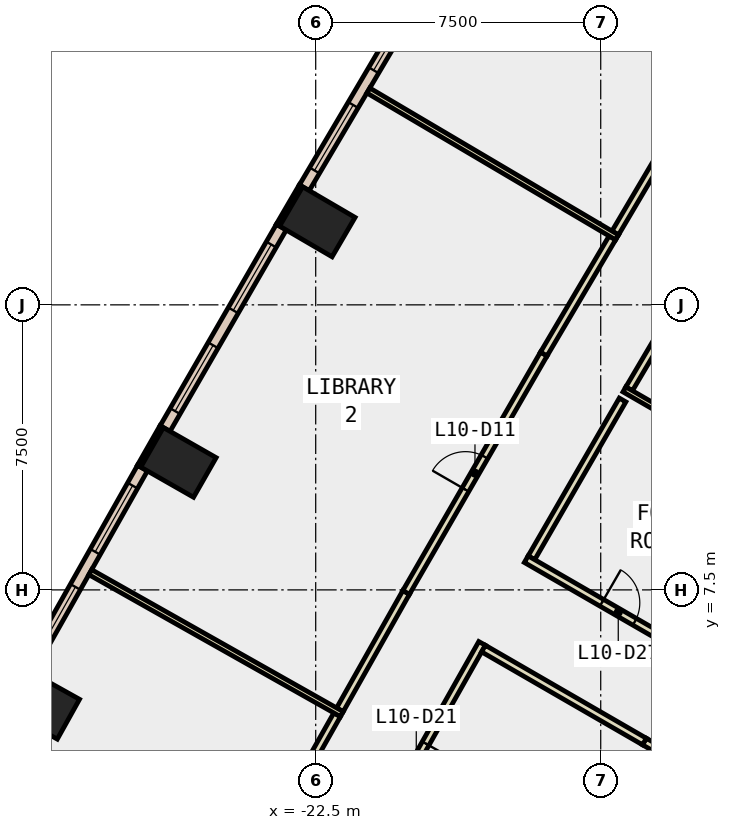
"""IFC4 building model, lengths in metres.
Left out: names, types, materials, properties, quantities, classifications, styles, units other than length and angle.
Written with IfcOpenShell. Run it as: python <this file> out.ifc"""

import sys

from ifc_helpers import new_model, si_unit, direction, frame, frame_2d, origin, origin_2d, place, context, subcontext, project, spatial, polyline, rectangle, outline, extrude, element, fill, save


model = new_model("IFC4")
c1 = context("Model", 3, precision=1e-05, world=origin(), true_north=direction((0.0, 1.0)))
c2 = subcontext(c1, "Body", "Model", "MODEL_VIEW")
j1 = project(units=[si_unit("LENGTHUNIT", "METRE"), si_unit("PLANEANGLEUNIT", "RADIAN")], contexts=[c1])
p1 = place(None, origin())
s1 = spatial("IfcSite", under=j1, at=p1, CompositionType="ELEMENT")
p2 = place(p1, origin())
s2 = spatial("IfcBuilding", under=s1, at=p2, CompositionType="ELEMENT")
p3 = place(p2, frame((0.0, 0.0, 51.8)))
s3 = spatial("IfcBuildingStorey", under=s2, at=p3, CompositionType="ELEMENT", Elevation=51.8)
for number, where, z_axis, x_axis in (
    (1, (-22.457, 17.186, -0.4), (0.0, 0.0, 1.0), (0.504, 0.864, 0.0)),
    (2, (-26.112, 10.855, -0.4), (0.0, 0.0, 1.0), (0.496, 0.869, 0.0)),
    (3, (-29.706, 4.487, -0.4), (0.0, 0.0, 1.0), (0.487, 0.873, 0.0)),
):
    element("IfcColumn", number, at=place(p3, frame(where, z_axis=z_axis, x_axis=x_axis)), inside=s3, PredefinedType="COLUMN", context=c2, shape_type="SweptSolid", body=[
        extrude(rectangle(XDim=1.2, YDim=1.6, at=origin_2d()), origin(), (0.0, 0.0, 1.0), 4.2),
    ])
p4 = place(p3, frame((0.0, 0.0, -0.4)))
e4 = element("IfcWall", 4, at=p4, inside=s3, PredefinedType="SHEAR", context=c2, shape_type="SweptSolid", body=[
    extrude(outline(polyline([(-12.402, 3.02), (-13.267, 3.52), (-13.856, 2.5), (-12.702, 2.5), (-12.402, 3.02)])), origin(), (0.0, 0.0, 1.0), 4.2),
])
p5 = place(p3, frame((-22.888, 18.133, 0.0), z_axis=(0.0, 0.0, 1.0), x_axis=(-0.504225229382, -0.863572184623, 0.0)))
e5 = element("IfcWall", 5, at=p5, inside=s3, PredefinedType="STANDARD", context=c2, shape_type="SweptSolid", body=[
    extrude(rectangle(XDim=1.2, YDim=0.1, at=frame_2d((0.6, 0.0))), origin(), (0.0, 0.0, 1.0), 3.8),
])
p6 = place(p3, frame((-26.553, 11.797, 0.0), z_axis=(0.0, 0.0, 1.0), x_axis=(-0.495766453659, -0.86845588456, 0.0)))
e6 = element("IfcWall", 6, at=p6, inside=s3, PredefinedType="STANDARD", context=c2, shape_type="SweptSolid", body=[
    extrude(rectangle(XDim=1.2, YDim=0.1, at=frame_2d((0.6, 0.0))), origin(), (0.0, 0.0, 1.0), 3.8),
])
p7 = place(p3, frame((-19.688, 23.351, 0.0), z_axis=(0.0, 0.0, 1.0), x_axis=(-0.508412153373, -0.861113861404, 0.0)))
e7 = element("IfcWall", 7, at=p7, inside=s3, PredefinedType="STANDARD", context=c2, shape_type="SweptSolid", body=[
    extrude(rectangle(XDim=6.121, YDim=0.3, at=frame_2d((3.061, 0.0))), origin(), (0.0, 0.0, 1.0), 3.8),
])
p8 = place(p7, frame((0.53, 0.0, 0.9)))
e8 = element("IfcOpeningElement", 8, at=p8, cuts=e7, PredefinedType="OPENING", context=c2, shape_type="SweptSolid", body=[
    extrude(rectangle(XDim=2.0, YDim=2.6, at=frame_2d((1.0, 1.3))), frame((0.0, 0.16, 0.0), z_axis=(0.0, -1.0, 0.0), x_axis=(1.0, 0.0, 0.0)), (0.0, 0.0, 1.0), 0.32),
])
p9 = place(p7, frame((3.591, 0.0, 0.9)))
e9 = element("IfcOpeningElement", 9, at=p9, cuts=e7, PredefinedType="OPENING", context=c2, shape_type="SweptSolid", body=[
    extrude(rectangle(XDim=2.0, YDim=2.6, at=frame_2d((1.0, 1.3))), frame((0.0, 0.16, 0.0), z_axis=(0.0, -1.0, 0.0), x_axis=(1.0, 0.0, 0.0)), (0.0, 0.0, 1.0), 0.32),
])
p10 = place(p3, frame((-23.404, 17.046, 0.0), z_axis=(0.0, 0.0, 1.0), x_axis=(-0.499957248001, -0.866050085256, 0.0)))
e10 = element("IfcWall", 10, at=p10, inside=s3, PredefinedType="STANDARD", context=c2, shape_type="SweptSolid", body=[
    extrude(rectangle(XDim=6.121, YDim=0.3, at=frame_2d((3.06, 0.0))), origin(), (0.0, 0.0, 1.0), 3.8),
])
p11 = place(p10, frame((0.53, 0.0, 0.9)))
e11 = element("IfcOpeningElement", 11, at=p11, cuts=e10, PredefinedType="OPENING", context=c2, shape_type="SweptSolid", body=[
    extrude(rectangle(XDim=2.0, YDim=2.6, at=frame_2d((1.0, 1.3))), frame((0.0, 0.16, 0.0), z_axis=(0.0, -1.0, 0.0), x_axis=(1.0, 0.0, 0.0)), (0.0, 0.0, 1.0), 0.32),
])
p12 = place(p10, frame((3.591, 0.0, 0.9)))
e12 = element("IfcOpeningElement", 12, at=p12, cuts=e10, PredefinedType="OPENING", context=c2, shape_type="SweptSolid", body=[
    extrude(rectangle(XDim=2.0, YDim=2.6, at=frame_2d((1.0, 1.3))), frame((0.0, 0.16, 0.0), z_axis=(0.0, -1.0, 0.0), x_axis=(1.0, 0.0, 0.0)), (0.0, 0.0, 1.0), 0.32),
])
p13 = place(p3, frame((-27.058, 10.705, 0.0), z_axis=(0.0, 0.0, 1.0), x_axis=(-0.49151046248, -0.870871669807, 0.0)))
e13 = element("IfcWall", 13, at=p13, inside=s3, PredefinedType="STANDARD", context=c2, shape_type="SweptSolid", body=[
    extrude(rectangle(XDim=6.122, YDim=0.3, at=frame_2d((3.061, 0.0))), origin(), (0.0, 0.0, 1.0), 3.8),
])
p14 = place(p13, frame((0.53, 0.0, 0.9)))
e14 = element("IfcOpeningElement", 14, at=p14, cuts=e13, PredefinedType="OPENING", context=c2, shape_type="SweptSolid", body=[
    extrude(rectangle(XDim=2.0, YDim=2.6, at=frame_2d((1.0, 1.3))), frame((0.0, 0.16, 0.0), z_axis=(0.0, -1.0, 0.0), x_axis=(1.0, 0.0, 0.0)), (0.0, 0.0, 1.0), 0.32),
])
p15 = place(p13, frame((3.591, 0.0, 0.9)))
e15 = element("IfcOpeningElement", 15, at=p15, cuts=e13, PredefinedType="OPENING", context=c2, shape_type="SweptSolid", body=[
    extrude(rectangle(XDim=2.0, YDim=2.6, at=frame_2d((1.0, 1.3))), frame((0.0, 0.16, 0.0), z_axis=(0.0, -1.0, 0.0), x_axis=(1.0, 0.0, 0.0)), (0.0, 0.0, 1.0), 0.32),
])
p16 = place(p3, frame((-14.425, 12.497, 0.0), z_axis=(0.0, 0.0, 1.0), x_axis=(-0.500026519606, -0.866010092142, 0.0)))
e16 = element("IfcWall", 16, at=p16, inside=s3, PredefinedType="PARTITIONING", context=c2, shape_type="SweptSolid", body=[
    extrude(rectangle(XDim=4.796, YDim=0.2, at=frame_2d((2.398, 0.0))), origin(), (0.0, 0.0, 1.0), 3.8),
])
p17 = place(p3, frame((-16.96, 8.308, 0.0), z_axis=(0.0, 0.0, 1.0), x_axis=(0.866018717003, -0.500011581666, 0.0)))
e17 = element("IfcWall", 17, at=p17, inside=s3, PredefinedType="PARTITIONING", context=c2, shape_type="SweptSolid", body=[
    extrude(rectangle(XDim=5.092, YDim=0.2, at=frame_2d((2.546, 0.0))), origin(), (0.0, 0.0, 1.0), 3.8),
])
p18 = place(p17, frame((2.296, 0.0, 0.0)))
e18 = element("IfcOpeningElement", 18, at=p18, cuts=e17, PredefinedType="OPENING", context=c2, shape_type="SweptSolid", body=[
    extrude(rectangle(XDim=1.0, YDim=2.1, at=frame_2d((0.5, 1.05))), frame((0.0, 0.11, 0.0), z_axis=(0.0, -1.0, 0.0), x_axis=(1.0, 0.0, 0.0)), (0.0, 0.0, 1.0), 0.22),
])
p19 = place(p3, frame((-13.323, 14.364, 0.0), z_axis=(0.0, 0.0, 1.0), x_axis=(-0.508274698505, -0.861195001646, 0.0)))
e19 = element("IfcWall", 19, at=p19, inside=s3, PredefinedType="PARTITIONING", context=c2, shape_type="SweptSolid", body=[
    extrude(rectangle(XDim=1.828, YDim=0.2, at=frame_2d((0.914, 0.0))), origin(), (0.0, 0.0, 1.0), 3.8),
])
p20 = place(p3, frame((-13.417, 3.26, 0.0), z_axis=(0.0, 0.0, 1.0), x_axis=(-0.866071776036, 0.499919672301, 0.0)))
e20 = element("IfcWall", 20, at=p20, inside=s3, PredefinedType="PARTITIONING", context=c2, shape_type="SweptSolid", body=[
    extrude(rectangle(XDim=0.5, YDim=0.2, at=frame_2d((0.25, 0.0))), origin(), (0.0, 0.0, 1.0), 2.4),
])
p21 = place(p3, frame((-18.122, 6.092, 0.0), z_axis=(0.0, 0.0, 1.0), x_axis=(-0.491430359405, -0.870916874251, 0.0)))
e21 = element("IfcWall", 21, at=p21, inside=s3, PredefinedType="PARTITIONING", context=c2, shape_type="SweptSolid", body=[
    extrude(rectangle(XDim=7.047, YDim=0.2, at=frame_2d((3.523, 0.0))), origin(), (0.0, 0.0, 1.0), 3.8),
])
p22 = place(p21, frame((3.024, 0.0, 0.0)))
e22 = element("IfcOpeningElement", 22, at=p22, cuts=e21, PredefinedType="OPENING", context=c2, shape_type="SweptSolid", body=[
    extrude(rectangle(XDim=1.0, YDim=2.1, at=frame_2d((0.5, 1.05))), frame((0.0, 0.11, 0.0), z_axis=(0.0, -1.0, 0.0), x_axis=(1.0, 0.0, 0.0)), (0.0, 0.0, 1.0), 0.22),
])
p23 = place(p3, frame((-14.618, 16.891, 0.0), z_axis=(0.0, 0.0, 1.0), x_axis=(0.508267810274, 0.861199067022, 0.0)))
e23 = element("IfcWall", 23, at=p23, inside=s3, PredefinedType="PARTITIONING", context=c2, shape_type="SweptSolid", body=[
    extrude(rectangle(XDim=3.547, YDim=0.2, at=frame_2d((1.774, 0.0))), origin(), (0.0, 0.0, 1.0), 3.8),
])
p24 = place(p3, frame((-21.863, 4.345, 0.0), z_axis=(0.0, 0.0, 1.0), x_axis=(0.491394823876, 0.87093692485, 0.0)))
e24 = element("IfcWall", 24, at=p24, inside=s3, PredefinedType="PARTITIONING", context=c2, shape_type="SweptSolid", body=[
    extrude(rectangle(XDim=3.547, YDim=0.2, at=frame_2d((1.773, 0.0))), origin(), (0.0, 0.0, 1.0), 3.8),
])
p25 = place(p3, frame((-20.12, 7.434, 0.0), z_axis=(0.0, 0.0, 1.0), x_axis=(0.500039488902, 0.866002603656, 0.0)))
e25 = element("IfcWall", 25, at=p25, inside=s3, PredefinedType="PARTITIONING", context=c2, shape_type="SweptSolid", body=[
    extrude(rectangle(XDim=7.244, YDim=0.2, at=frame_2d((3.622, 0.0))), origin(), (0.0, 0.0, 1.0), 3.8),
])
p26 = place(p25, frame((3.122, 0.0, 0.0)))
e26 = element("IfcOpeningElement", 26, at=p26, cuts=e25, PredefinedType="OPENING", context=c2, shape_type="SweptSolid", body=[
    extrude(rectangle(XDim=1.0, YDim=2.1, at=frame_2d((0.5, 1.05))), frame((0.0, 0.11, 0.0), z_axis=(0.0, -1.0, 0.0), x_axis=(1.0, 0.0, 0.0)), (0.0, 0.0, 1.0), 0.22),
])
p27 = place(p3, frame((-16.498, 13.707, 0.0), z_axis=(0.0, 0.0, 1.0), x_axis=(0.508471945541, 0.861078556578, 0.0)))
e27 = element("IfcWall", 27, at=p27, inside=s3, PredefinedType="PARTITIONING", context=c2, shape_type="SweptSolid", body=[
    extrude(rectangle(XDim=3.548, YDim=0.2, at=frame_2d((1.774, 0.0))), origin(), (0.0, 0.0, 1.0), 3.8),
])
p28 = place(p3, frame((-23.681, 1.124, 0.0), z_axis=(0.0, 0.0, 1.0), x_axis=(0.491485799319, 0.870885588965, 0.0)))
e28 = element("IfcWall", 28, at=p28, inside=s3, PredefinedType="PARTITIONING", context=c2, shape_type="SweptSolid", body=[
    extrude(rectangle(XDim=3.548, YDim=0.2, at=frame_2d((1.774, 0.0))), origin(), (0.0, 0.0, 1.0), 3.8),
])
p29 = place(p3, frame((-14.377, 12.775, 0.0), z_axis=(0.0, 0.0, 1.0), x_axis=(0.866051730117, -0.499954398681, 0.0)))
e29 = element("IfcWall", 29, at=p29, inside=s3, PredefinedType="PARTITIONING", context=c2, shape_type="SweptSolid", body=[
    extrude(rectangle(XDim=5.588, YDim=0.15, at=frame_2d((2.794, 0.0))), origin(), (0.0, 0.0, 1.0), 3.8),
])
p30 = place(p3, frame((-14.57, 16.776, 0.0), z_axis=(0.0, 0.0, 1.0), x_axis=(-0.861124703857, 0.508393788718, 0.0)))
e30 = element("IfcWall", 30, at=p30, inside=s3, PredefinedType="PARTITIONING", context=c2, shape_type="SweptSolid", body=[
    extrude(rectangle(XDim=7.6, YDim=0.15, at=frame_2d((3.8, 0.0))), origin(), (0.0, 0.0, 1.0), 3.8),
])
p31 = place(p3, frame((-21.813, 4.231, 0.0), z_axis=(0.0, 0.0, 1.0), x_axis=(-0.870901264369, 0.491458022337, 0.0)))
e31 = element("IfcWall", 31, at=p31, inside=s3, PredefinedType="PARTITIONING", context=c2, shape_type="SweptSolid", body=[
    extrude(rectangle(XDim=7.6, YDim=0.15, at=frame_2d((3.8, 0.0))), origin(), (0.0, 0.0, 1.0), 3.8),
])
p32 = place(p3, frame((-13.85, 3.51, 0.0), z_axis=(0.0, 0.0, 1.0), x_axis=(-0.865969361037, 0.500097056325, 0.0)))
e32 = element("IfcWall", 32, at=p32, inside=s3, PredefinedType="PARTITIONING", context=c2, shape_type="SweptSolid", body=[
    extrude(rectangle(XDim=4.889, YDim=0.2, at=frame_2d((2.445, 0.0))), origin(), (0.0, 0.0, 1.0), 3.8),
])
p33 = place(p8, origin())
e33 = element("IfcWindow", 33, at=p33, inside=s3, PartitioningType="SINGLE_PANEL", PredefinedType="WINDOW", context=c2, shape_type="SweptSolid", body=[
    extrude(rectangle(XDim=2.0, YDim=2.6, at=frame_2d((1.0, 1.3))), frame((0.0, 0.03, 0.0), z_axis=(0.0, -1.0, 0.0), x_axis=(1.0, 0.0, 0.0)), (0.0, 0.0, 1.0), 0.06),
])
fill(e8, e33)
p34 = place(p9, origin())
e34 = element("IfcWindow", 34, at=p34, inside=s3, PartitioningType="SINGLE_PANEL", PredefinedType="WINDOW", context=c2, shape_type="SweptSolid", body=[
    extrude(rectangle(XDim=2.0, YDim=2.6, at=frame_2d((1.0, 1.3))), frame((0.0, 0.03, 0.0), z_axis=(0.0, -1.0, 0.0), x_axis=(1.0, 0.0, 0.0)), (0.0, 0.0, 1.0), 0.06),
])
fill(e9, e34)
p35 = place(p11, origin())
e35 = element("IfcWindow", 35, at=p35, inside=s3, PartitioningType="SINGLE_PANEL", PredefinedType="WINDOW", context=c2, shape_type="SweptSolid", body=[
    extrude(rectangle(XDim=2.0, YDim=2.6, at=frame_2d((1.0, 1.3))), frame((0.0, 0.03, 0.0), z_axis=(0.0, -1.0, 0.0), x_axis=(1.0, 0.0, 0.0)), (0.0, 0.0, 1.0), 0.06),
])
fill(e11, e35)
p36 = place(p12, origin())
e36 = element("IfcWindow", 36, at=p36, inside=s3, PartitioningType="SINGLE_PANEL", PredefinedType="WINDOW", context=c2, shape_type="SweptSolid", body=[
    extrude(rectangle(XDim=2.0, YDim=2.6, at=frame_2d((1.0, 1.3))), frame((0.0, 0.03, 0.0), z_axis=(0.0, -1.0, 0.0), x_axis=(1.0, 0.0, 0.0)), (0.0, 0.0, 1.0), 0.06),
])
fill(e12, e36)
p37 = place(p14, origin())
e37 = element("IfcWindow", 37, at=p37, inside=s3, PartitioningType="SINGLE_PANEL", PredefinedType="WINDOW", context=c2, shape_type="SweptSolid", body=[
    extrude(rectangle(XDim=2.0, YDim=2.6, at=frame_2d((1.0, 1.3))), frame((0.0, 0.03, 0.0), z_axis=(0.0, -1.0, 0.0), x_axis=(1.0, 0.0, 0.0)), (0.0, 0.0, 1.0), 0.06),
])
fill(e14, e37)
p38 = place(p15, origin())
e38 = element("IfcWindow", 38, at=p38, inside=s3, PartitioningType="SINGLE_PANEL", PredefinedType="WINDOW", context=c2, shape_type="SweptSolid", body=[
    extrude(rectangle(XDim=2.0, YDim=2.6, at=frame_2d((1.0, 1.3))), frame((0.0, 0.03, 0.0), z_axis=(0.0, -1.0, 0.0), x_axis=(1.0, 0.0, 0.0)), (0.0, 0.0, 1.0), 0.06),
])
fill(e15, e38)
p39 = place(p26, origin())
e39 = element("IfcDoor", 39, at=p39, inside=s3, OperationType="SINGLE_SWING_LEFT", PredefinedType="DOOR", context=c2, shape_type="SweptSolid", body=[
    extrude(rectangle(XDim=1.0, YDim=2.1, at=frame_2d((0.5, 1.05))), frame((0.0, 0.025, 0.0), z_axis=(0.0, -1.0, 0.0), x_axis=(1.0, 0.0, 0.0)), (0.0, 0.0, 1.0), 0.05),
])
fill(e26, e39)
p40 = place(p22, origin())
e40 = element("IfcDoor", 40, at=p40, inside=s3, OperationType="SINGLE_SWING_LEFT", PredefinedType="DOOR", context=c2, shape_type="SweptSolid", body=[
    extrude(rectangle(XDim=1.0, YDim=2.1, at=frame_2d((0.5, 1.05))), frame((0.0, 0.025, 0.0), z_axis=(0.0, -1.0, 0.0), x_axis=(1.0, 0.0, 0.0)), (0.0, 0.0, 1.0), 0.05),
])
fill(e22, e40)
p41 = place(p18, origin())
e41 = element("IfcDoor", 41, at=p41, inside=s3, OperationType="SINGLE_SWING_LEFT", PredefinedType="DOOR", context=c2, shape_type="SweptSolid", body=[
    extrude(rectangle(XDim=1.0, YDim=2.1, at=frame_2d((0.5, 1.05))), frame((0.0, 0.025, 0.0), z_axis=(0.0, -1.0, 0.0), x_axis=(1.0, 0.0, 0.0)), (0.0, 0.0, 1.0), 0.05),
])
fill(e18, e41)
save(model, sys.argv[1])
